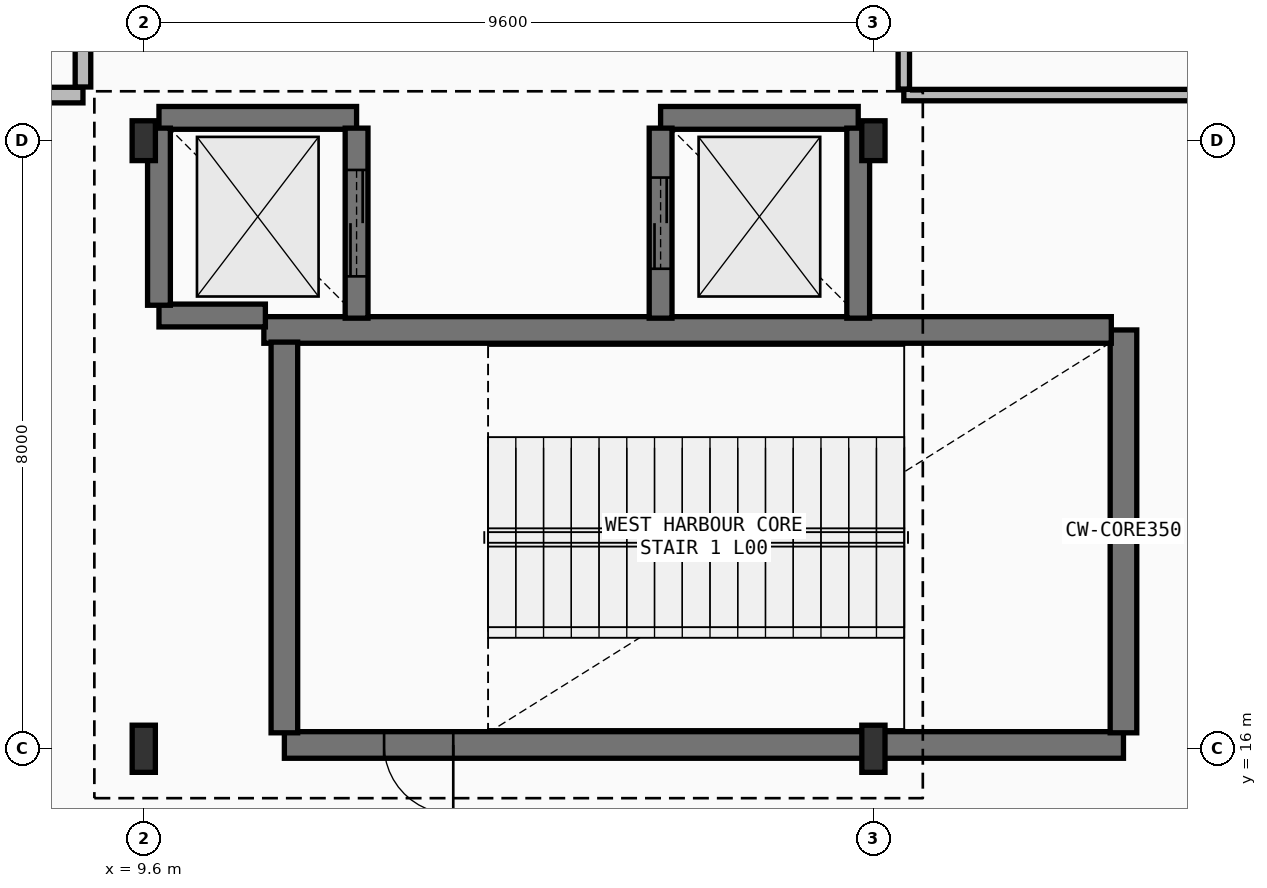
"""IFC4 building model, lengths in metres.
Left out: names, types, materials, properties, quantities, classifications, styles, units other than length and angle.
Written with IfcOpenShell. Run it as: python <this file> out.ifc"""

import sys

from ifc_helpers import new_model, si_unit, direction, frame, frame_2d, origin, origin_2d, place, context, subcontext, project, spatial, rectangle, i_section, extrude, element, fill, save


model = new_model("IFC4")
c1 = context("Model", 3, precision=1e-05, world=origin(), true_north=direction((0.0, 1.0)))
c2 = subcontext(c1, "Body", "Model", "MODEL_VIEW")
j1 = project(units=[si_unit("LENGTHUNIT", "METRE"), si_unit("PLANEANGLEUNIT", "RADIAN")], contexts=[c1])
p1 = place(None, origin())
s1 = spatial("IfcSite", under=j1, at=p1, CompositionType="ELEMENT")
p2 = place(p1, origin())
s2 = spatial("IfcBuilding", under=s1, at=p2, CompositionType="ELEMENT")
p3 = place(p2, origin())
s3 = spatial("IfcBuildingStorey", under=s2, at=p3, CompositionType="ELEMENT", Elevation=0.0)
p4 = place(p3, frame((9.6, 16.0, 0.0), z_axis=(0.0, 0.0, 1.0), x_axis=(1.0, 0.0, 0.0)))
e1 = element("IfcColumn", 1, at=p4, inside=s3, PredefinedType="COLUMN", context=c2, shape_type="SweptSolid", body=[
    extrude(i_section(OverallWidth=0.305, OverallDepth=0.62, WebThickness=0.021, FlangeThickness=0.04, FilletRadius=0.027, at=origin_2d()), origin(), (0.0, 0.0, 1.0), 6.0),
])
p5 = place(p3, frame((9.6, 24.0, 0.0), z_axis=(0.0, 0.0, 1.0), x_axis=(1.0, 0.0, 0.0)))
e2 = element("IfcColumn", 2, at=p5, inside=s3, PredefinedType="COLUMN", context=c2, shape_type="SweptSolid", body=[
    extrude(i_section(OverallWidth=0.306, OverallDepth=0.524, WebThickness=0.021, FlangeThickness=0.04, FilletRadius=0.027, at=origin_2d()), origin(), (0.0, 0.0, 1.0), 6.0),
])
p6 = place(p3, frame((19.2, 16.0, 0.0), z_axis=(0.0, 0.0, 1.0), x_axis=(1.0, 0.0, 0.0)))
e3 = element("IfcColumn", 3, at=p6, inside=s3, PredefinedType="COLUMN", context=c2, shape_type="SweptSolid", body=[
    extrude(i_section(OverallWidth=0.305, OverallDepth=0.62, WebThickness=0.021, FlangeThickness=0.04, FilletRadius=0.027, at=origin_2d()), origin(), (0.0, 0.0, 1.0), 6.0),
])
p7 = place(p3, frame((19.2, 24.0, 0.0), z_axis=(0.0, 0.0, 1.0), x_axis=(1.0, 0.0, 0.0)))
e4 = element("IfcColumn", 4, at=p7, inside=s3, PredefinedType="COLUMN", context=c2, shape_type="SweptSolid", body=[
    extrude(i_section(OverallWidth=0.306, OverallDepth=0.524, WebThickness=0.021, FlangeThickness=0.04, FilletRadius=0.027, at=origin_2d()), origin(), (0.0, 0.0, 1.0), 6.0),
])
p8 = place(p3, frame((22.49, 16.05, 0.0), z_axis=(0.0, 0.0, 1.0), x_axis=(-1.0, 0.0, 0.0)))
e5 = element("IfcWall", 5, at=p8, inside=s3, PredefinedType="SHEAR", context=c2, shape_type="SweptSolid", body=[
    extrude(rectangle(XDim=11.04, YDim=0.35, at=frame_2d((5.52, 0.0))), origin(), (0.0, 0.0, 1.0), 5.77),
])
p9 = place(p8, frame((8.818, 0.0, 0.0)))
e6 = element("IfcOpeningElement", 6, at=p9, cuts=e5, PredefinedType="OPENING", context=c2, shape_type="SweptSolid", body=[
    extrude(rectangle(XDim=0.91, YDim=2.08, at=frame_2d((0.455, 1.04))), frame((0.0, 0.185, 0.0), z_axis=(0.0, -1.0, 0.0), x_axis=(1.0, 0.0, 0.0)), (0.0, 0.0, 1.0), 0.37),
])
p10 = place(p3, frame((22.49, 21.51, 0.0), z_axis=(0.0, 0.0, 1.0), x_axis=(0.0, -1.0, 0.0)))
e7 = element("IfcWall", 7, at=p10, inside=s3, PredefinedType="SHEAR", context=c2, shape_type="SweptSolid", body=[
    extrude(rectangle(XDim=5.3, YDim=0.35, at=frame_2d((2.65, 0.0))), origin(), (0.0, 0.0, 1.0), 5.77),
])
p11 = place(p3, frame((11.18, 21.51, 0.0), z_axis=(0.0, 0.0, 1.0), x_axis=(1.0, 0.0, 0.0)))
e8 = element("IfcWall", 8, at=p11, inside=s3, PredefinedType="SHEAR", context=c2, shape_type="SweptSolid", body=[
    extrude(rectangle(XDim=11.15, YDim=0.35, at=frame_2d((5.575, 0.0))), origin(), (0.0, 0.0, 1.0), 5.77),
])
p12 = place(p3, frame((11.45, 16.21, 0.0), z_axis=(0.0, 0.0, 1.0), x_axis=(0.0, 1.0, 0.0)))
e9 = element("IfcWall", 9, at=p12, inside=s3, PredefinedType="SHEAR", context=c2, shape_type="SweptSolid", body=[
    extrude(rectangle(XDim=5.14, YDim=0.35, at=frame_2d((2.57, 0.0))), origin(), (0.0, 0.0, 1.0), 5.77),
])
p13 = place(p3, frame((12.4, 24.3, 0.0), z_axis=(0.0, 0.0, 1.0), x_axis=(-1.0, 0.0, 0.0)))
e10 = element("IfcWall", 10, at=p13, inside=s3, PredefinedType="SHEAR", context=c2, shape_type="SweptSolid", body=[
    extrude(rectangle(XDim=2.6, YDim=0.3, at=frame_2d((1.3, 0.0))), origin(), (0.0, 0.0, 1.0), 5.77),
])
p14 = place(p3, frame((9.8, 21.7, 0.0), z_axis=(0.0, 0.0, 1.0), x_axis=(1.0, 0.0, 0.0)))
e11 = element("IfcWall", 11, at=p14, inside=s3, PredefinedType="SHEAR", context=c2, shape_type="SweptSolid", body=[
    extrude(rectangle(XDim=1.4, YDim=0.3, at=frame_2d((0.7, 0.0))), origin(), (0.0, 0.0, 1.0), 5.77),
])
p15 = place(p3, frame((12.4, 21.665, 0.0), z_axis=(0.0, 0.0, 1.0), x_axis=(0.0, 1.0, 0.0)))
e12 = element("IfcWall", 12, at=p15, inside=s3, PredefinedType="SHEAR", context=c2, shape_type="SweptSolid", body=[
    extrude(rectangle(XDim=2.5, YDim=0.3, at=frame_2d((1.25, 0.0))), origin(), (0.0, 0.0, 1.0), 5.77),
])
p16 = place(p15, frame((0.55, 0.0, 0.0)))
e13 = element("IfcOpeningElement", 13, at=p16, cuts=e12, PredefinedType="OPENING", context=c2, shape_type="SweptSolid", body=[
    extrude(rectangle(XDim=1.4, YDim=2.26, at=frame_2d((0.7, 1.13))), frame((0.0, 0.16, 0.0), z_axis=(0.0, -1.0, 0.0), x_axis=(1.0, 0.0, 0.0)), (0.0, 0.0, 1.0), 0.32),
])
p17 = place(p3, frame((9.8, 24.165, 0.0), z_axis=(0.0, 0.0, 1.0), x_axis=(0.0, -1.0, 0.0)))
e14 = element("IfcWall", 14, at=p17, inside=s3, PredefinedType="SHEAR", context=c2, shape_type="SweptSolid", body=[
    extrude(rectangle(XDim=2.33, YDim=0.3, at=frame_2d((1.165, 0.0))), origin(), (0.0, 0.0, 1.0), 5.77),
])
p18 = place(p3, frame((19.0, 24.3, 0.0), z_axis=(0.0, 0.0, 1.0), x_axis=(-1.0, 0.0, 0.0)))
e15 = element("IfcWall", 15, at=p18, inside=s3, PredefinedType="SHEAR", context=c2, shape_type="SweptSolid", body=[
    extrude(rectangle(XDim=2.6, YDim=0.3, at=frame_2d((1.3, 0.0))), origin(), (0.0, 0.0, 1.0), 5.77),
])
p19 = place(p3, frame((19.0, 21.665, 0.0), z_axis=(0.0, 0.0, 1.0), x_axis=(0.0, 1.0, 0.0)))
e16 = element("IfcWall", 16, at=p19, inside=s3, PredefinedType="SHEAR", context=c2, shape_type="SweptSolid", body=[
    extrude(rectangle(XDim=2.5, YDim=0.3, at=frame_2d((1.25, 0.0))), origin(), (0.0, 0.0, 1.0), 5.77),
])
p20 = place(p3, frame((16.4, 24.165, 0.0), z_axis=(0.0, 0.0, 1.0), x_axis=(0.0, -1.0, 0.0)))
e17 = element("IfcWall", 17, at=p20, inside=s3, PredefinedType="SHEAR", context=c2, shape_type="SweptSolid", body=[
    extrude(rectangle(XDim=2.5, YDim=0.3, at=frame_2d((1.25, 0.0))), origin(), (0.0, 0.0, 1.0), 5.77),
])
p21 = place(p20, frame((0.65, 0.0, 0.0)))
e18 = element("IfcOpeningElement", 18, at=p21, cuts=e17, PredefinedType="OPENING", context=c2, shape_type="SweptSolid", body=[
    extrude(rectangle(XDim=1.2, YDim=2.2, at=frame_2d((0.6, 1.1))), frame((0.0, 0.16, 0.0), z_axis=(0.0, -1.0, 0.0), x_axis=(1.0, 0.0, 0.0)), (0.0, 0.0, 1.0), 0.32),
])
p22 = place(p3, frame((0.8, 24.6, 0.0), z_axis=(0.0, 0.0, 1.0), x_axis=(1.0, 0.0, 0.0)))
e19 = element("IfcWall", 19, at=p22, inside=s3, PredefinedType="SOLIDWALL", context=c2, shape_type="SweptSolid", body=[
    extrude(rectangle(XDim=8.0, YDim=0.205, at=frame_2d((4.0, 0.0))), origin(), (0.0, 0.0, 1.0), 5.77),
])
p23 = place(p22, frame((3.45, 0.0, 0.0)))
e20 = element("IfcOpeningElement", 20, at=p23, cuts=e19, PredefinedType="OPENING", context=c2, shape_type="SweptSolid", body=[
    extrude(rectangle(XDim=1.1, YDim=2.28, at=frame_2d((0.55, 1.14))), frame((0.0, 0.113, 0.0), z_axis=(0.0, -1.0, 0.0), x_axis=(1.0, 0.0, 0.0)), (0.0, 0.0, 1.0), 0.225),
])
p24 = place(p3, frame((8.8, 24.707, 0.0), z_axis=(0.0, 0.0, 1.0), x_axis=(0.0, 1.0, 0.0)))
e21 = element("IfcWall", 21, at=p24, inside=s3, PredefinedType="SOLIDWALL", context=c2, shape_type="SweptSolid", body=[
    extrude(rectangle(XDim=7.293, YDim=0.205, at=frame_2d((3.647, 0.0))), origin(), (0.0, 0.0, 1.0), 5.15),
])
p25 = place(p3, frame((19.6, 24.6, 0.0), z_axis=(0.0, 0.0, 1.0), x_axis=(1.0, 0.0, 0.0)))
e22 = element("IfcWall", 22, at=p25, inside=s3, PredefinedType="PARTITIONING", context=c2, shape_type="SweptSolid", body=[
    extrude(rectangle(XDim=18.4, YDim=0.15, at=frame_2d((9.2, 0.0))), origin(), (0.0, 0.0, 1.0), 5.14),
])
p26 = place(p25, frame((11.226, 0.0, 0.0)))
e23 = element("IfcOpeningElement", 23, at=p26, cuts=e22, PredefinedType="OPENING", context=c2, shape_type="SweptSolid", body=[
    extrude(rectangle(XDim=1.13, YDim=2.3, at=frame_2d((0.565, 1.15))), frame((0.0, 0.085, 0.0), z_axis=(0.0, -1.0, 0.0), x_axis=(1.0, 0.0, 0.0)), (0.0, 0.0, 1.0), 0.17),
])
p27 = place(p3, frame((19.6, 39.321, 0.0), z_axis=(0.0, 0.0, 1.0), x_axis=(0.0, -1.0, 0.0)))
e24 = element("IfcWall", 24, at=p27, inside=s3, PredefinedType="PARTITIONING", context=c2, shape_type="SweptSolid", body=[
    extrude(rectangle(XDim=14.642, YDim=0.15, at=frame_2d((7.321, 0.0))), origin(), (0.0, 0.0, 1.0), 5.35),
])
p28 = place(p9, origin())
e25 = element("IfcDoor", 25, at=p28, inside=s3, OperationType="SINGLE_SWING_RIGHT", PredefinedType="DOOR", context=c2, shape_type="SweptSolid", body=[
    extrude(rectangle(XDim=0.91, YDim=2.08, at=frame_2d((0.455, 1.04))), frame((0.0, 0.025, 0.0), z_axis=(0.0, -1.0, 0.0), x_axis=(1.0, 0.0, 0.0)), (0.0, 0.0, 1.0), 0.05),
])
fill(e6, e25)
p29 = place(p16, origin())
e26 = element("IfcDoor", 26, at=p29, inside=s3, OperationType="DOUBLE_DOOR_SLIDING", PredefinedType="DOOR", context=c2, shape_type="SweptSolid", body=[
    extrude(rectangle(XDim=1.4, YDim=2.26, at=frame_2d((0.7, 1.13))), frame((0.0, 0.025, 0.0), z_axis=(0.0, -1.0, 0.0), x_axis=(1.0, 0.0, 0.0)), (0.0, 0.0, 1.0), 0.05),
])
fill(e13, e26)
p30 = place(p21, origin())
e27 = element("IfcDoor", 27, at=p30, inside=s3, OperationType="DOUBLE_DOOR_SLIDING", PredefinedType="DOOR", context=c2, shape_type="SweptSolid", body=[
    extrude(rectangle(XDim=1.2, YDim=2.2, at=frame_2d((0.6, 1.1))), frame((0.0, 0.025, 0.0), z_axis=(0.0, -1.0, 0.0), x_axis=(1.0, 0.0, 0.0)), (0.0, 0.0, 1.0), 0.05),
])
fill(e18, e27)
save(model, sys.argv[1])
